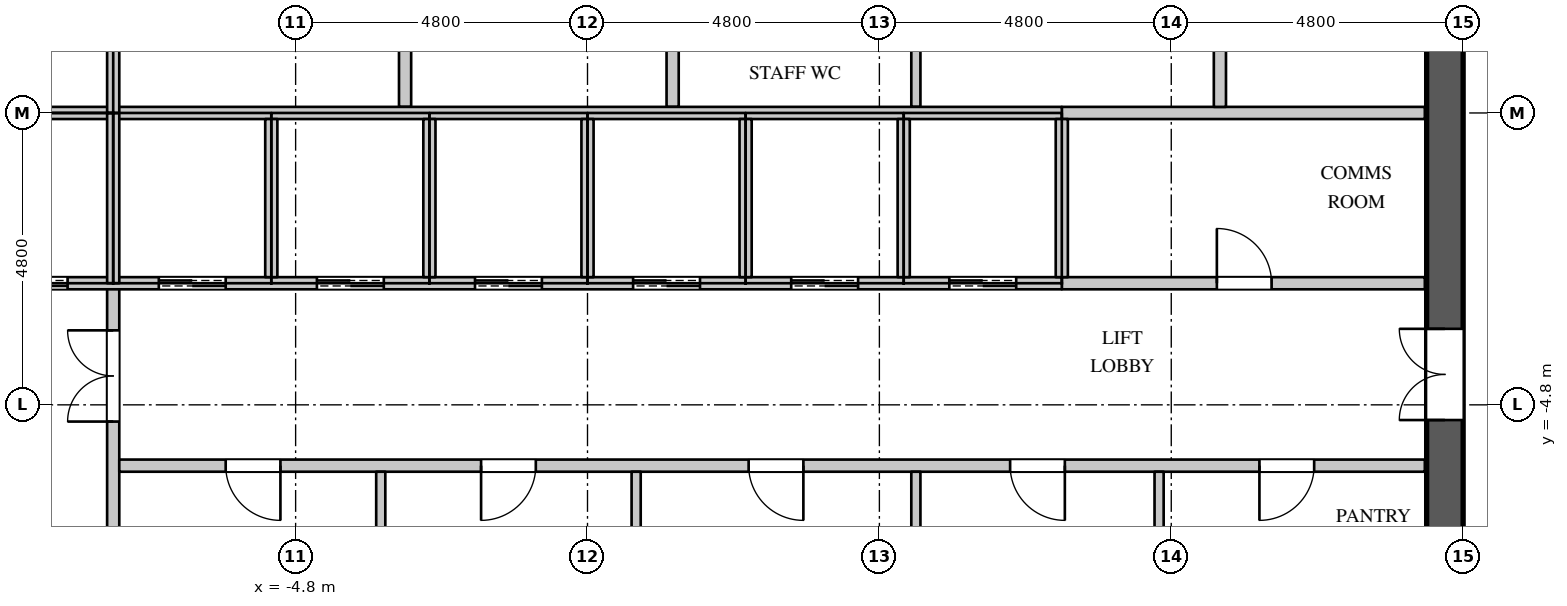
"""IFC4 building model, lengths in metres.
Left out: names, types, materials, properties, quantities, classifications, styles, units other than length and angle.
Written with IfcOpenShell. Run it as: python <this file> out.ifc"""

import sys

from ifc_helpers import new_model, si_unit, direction, frame, frame_2d, origin, place, context, subcontext, project, spatial, rectangle, extrude, element, fill, save


model = new_model("IFC4")
c1 = context("Model", 3, precision=1e-05, world=origin(), true_north=direction((0.0, 1.0)))
c2 = subcontext(c1, "Body", "Model", "MODEL_VIEW")
j1 = project(units=[si_unit("LENGTHUNIT", "METRE"), si_unit("PLANEANGLEUNIT", "RADIAN")], contexts=[c1])
p1 = place(None, origin())
s1 = spatial("IfcSite", under=j1, at=p1, CompositionType="ELEMENT")
p2 = place(p1, origin())
s2 = spatial("IfcBuilding", under=s1, at=p2, CompositionType="ELEMENT")
p3 = place(p2, frame((0.0, 0.0, 213.9)))
s3 = spatial("IfcBuildingStorey", under=s2, at=p3, CompositionType="ELEMENT", Elevation=213.9)
p4 = place(p3, frame((14.1, -11.4, 0.0), z_axis=(0.0, 0.0, 1.0), x_axis=(0.0, 1.0, 0.0)))
e1 = element("IfcWall", 1, at=p4, inside=s3, PredefinedType="SHEAR", context=c2, shape_type="SweptSolid", body=[
    extrude(rectangle(XDim=22.8, YDim=0.6, at=frame_2d((11.4, 0.0))), origin(), (0.0, 0.0, 1.0), 4.2),
])
p5 = place(p4, frame((20.45, 0.0, 0.0)))
e2 = element("IfcOpeningElement", 2, at=p5, cuts=e1, PredefinedType="OPENING", context=c2, shape_type="SweptSolid", body=[
    extrude(rectangle(XDim=1.1, YDim=2.2, at=frame_2d((0.55, 1.1))), frame((0.0, 0.31, 0.0), z_axis=(0.0, -1.0, 0.0), x_axis=(1.0, 0.0, 0.0)), (0.0, 0.0, 1.0), 0.62),
])
p6 = place(p4, frame((1.25, 0.0, 0.0)))
e3 = element("IfcOpeningElement", 3, at=p6, cuts=e1, PredefinedType="OPENING", context=c2, shape_type="SweptSolid", body=[
    extrude(rectangle(XDim=1.1, YDim=2.2, at=frame_2d((0.55, 1.1))), frame((0.0, 0.31, 0.0), z_axis=(0.0, -1.0, 0.0), x_axis=(1.0, 0.0, 0.0)), (0.0, 0.0, 1.0), 0.62),
])
p7 = place(p4, frame((14.95, 0.0, 0.0)))
e4 = element("IfcOpeningElement", 4, at=p7, cuts=e1, PredefinedType="OPENING", context=c2, shape_type="SweptSolid", body=[
    extrude(rectangle(XDim=1.5, YDim=2.4, at=frame_2d((0.75, 1.2))), frame((0.0, 0.31, 0.0), z_axis=(0.0, -1.0, 0.0), x_axis=(1.0, 0.0, 0.0)), (0.0, 0.0, 1.0), 0.62),
])
p8 = place(p4, frame((6.35, 0.0, 0.0)))
e5 = element("IfcOpeningElement", 5, at=p8, cuts=e1, PredefinedType="OPENING", context=c2, shape_type="SweptSolid", body=[
    extrude(rectangle(XDim=1.5, YDim=2.4, at=frame_2d((0.75, 1.2))), frame((0.0, 0.31, 0.0), z_axis=(0.0, -1.0, 0.0), x_axis=(1.0, 0.0, 0.0)), (0.0, 0.0, 1.0), 0.62),
])
p9 = place(p3, frame((-7.8, -8.075, 0.0), z_axis=(0.0, 0.0, 1.0), x_axis=(0.0, 1.0, 0.0)))
e6 = element("IfcWall", 6, at=p9, inside=s3, PredefinedType="PARTITIONING", context=c2, shape_type="SweptSolid", body=[
    extrude(rectangle(XDim=5.275, YDim=0.2, at=frame_2d((2.637, 0.0))), origin(), (0.0, 0.0, 1.0), 3.95),
])
p10 = place(p9, frame((3.0, 0.0, 0.0)))
e7 = element("IfcOpeningElement", 7, at=p10, cuts=e6, PredefinedType="OPENING", context=c2, shape_type="SweptSolid", body=[
    extrude(rectangle(XDim=1.5, YDim=2.4, at=frame_2d((0.75, 1.2))), frame((0.0, 0.11, 0.0), z_axis=(0.0, -1.0, 0.0), x_axis=(1.0, 0.0, 0.0)), (0.0, 0.0, 1.0), 0.22),
])
p11 = place(p3, frame((-7.7, -5.8, 0.0), z_axis=(0.0, 0.0, 1.0), x_axis=(1.0, 0.0, 0.0)))
e8 = element("IfcWall", 8, at=p11, inside=s3, PredefinedType="PARTITIONING", context=c2, shape_type="SweptSolid", body=[
    extrude(rectangle(XDim=21.47, YDim=0.2, at=frame_2d((10.735, 0.0))), origin(), (0.0, 0.0, 1.0), 3.95),
])
p12 = place(p11, frame((1.75, 0.0, 0.0)))
e9 = element("IfcOpeningElement", 9, at=p12, cuts=e8, PredefinedType="OPENING", context=c2, shape_type="SweptSolid", body=[
    extrude(rectangle(XDim=0.9, YDim=2.2, at=frame_2d((0.45, 1.1))), frame((0.0, 0.11, 0.0), z_axis=(0.0, -1.0, 0.0), x_axis=(1.0, 0.0, 0.0)), (0.0, 0.0, 1.0), 0.22),
])
p13 = place(p11, frame((5.95, 0.0, 0.0)))
e10 = element("IfcOpeningElement", 10, at=p13, cuts=e8, PredefinedType="OPENING", context=c2, shape_type="SweptSolid", body=[
    extrude(rectangle(XDim=0.9, YDim=2.2, at=frame_2d((0.45, 1.1))), frame((0.0, 0.11, 0.0), z_axis=(0.0, -1.0, 0.0), x_axis=(1.0, 0.0, 0.0)), (0.0, 0.0, 1.0), 0.22),
])
p14 = place(p11, frame((10.35, 0.0, 0.0)))
e11 = element("IfcOpeningElement", 11, at=p14, cuts=e8, PredefinedType="OPENING", context=c2, shape_type="SweptSolid", body=[
    extrude(rectangle(XDim=0.9, YDim=2.2, at=frame_2d((0.45, 1.1))), frame((0.0, 0.11, 0.0), z_axis=(0.0, -1.0, 0.0), x_axis=(1.0, 0.0, 0.0)), (0.0, 0.0, 1.0), 0.22),
])
p15 = place(p11, frame((14.65, 0.0, 0.0)))
e12 = element("IfcOpeningElement", 12, at=p15, cuts=e8, PredefinedType="OPENING", context=c2, shape_type="SweptSolid", body=[
    extrude(rectangle(XDim=0.9, YDim=2.2, at=frame_2d((0.45, 1.1))), frame((0.0, 0.11, 0.0), z_axis=(0.0, -1.0, 0.0), x_axis=(1.0, 0.0, 0.0)), (0.0, 0.0, 1.0), 0.22),
])
p16 = place(p11, frame((18.75, 0.0, 0.0)))
e13 = element("IfcOpeningElement", 13, at=p16, cuts=e8, PredefinedType="OPENING", context=c2, shape_type="SweptSolid", body=[
    extrude(rectangle(XDim=0.9, YDim=2.2, at=frame_2d((0.45, 1.1))), frame((0.0, 0.11, 0.0), z_axis=(0.0, -1.0, 0.0), x_axis=(1.0, 0.0, 0.0)), (0.0, 0.0, 1.0), 0.22),
])
for number, where, z_axis, x_axis in (
    (14, (-3.4, -11.37, 0.0), (0.0, 0.0, 1.0), (0.0, 1.0, 0.0)),
    (15, (0.8, -11.37, 0.0), (0.0, 0.0, 1.0), (0.0, 1.0, 0.0)),
):
    element("IfcWall", number, at=place(p3, frame(where, z_axis=z_axis, x_axis=x_axis)), inside=s3, PredefinedType="PARTITIONING", context=c2, shape_type="SweptSolid", body=[
        extrude(rectangle(XDim=5.47, YDim=0.15, at=frame_2d((2.735, 0.0))), origin(), (0.0, 0.0, 1.0), 3.95),
    ])
p17 = place(p3, frame((5.4, -8.2, 0.0), z_axis=(0.0, 0.0, 1.0), x_axis=(0.0, 1.0, 0.0)))
e16 = element("IfcWall", 16, at=p17, inside=s3, PredefinedType="PARTITIONING", context=c2, shape_type="SweptSolid", body=[
    extrude(rectangle(XDim=2.3, YDim=0.15, at=frame_2d((1.15, 0.0))), origin(), (0.0, 0.0, 1.0), 3.95),
])
p18 = place(p3, frame((5.4, 0.1, 0.0), z_axis=(0.0, 0.0, 1.0), x_axis=(0.0, 1.0, 0.0)))
e17 = element("IfcWall", 17, at=p18, inside=s3, PredefinedType="PARTITIONING", context=c2, shape_type="SweptSolid", body=[
    extrude(rectangle(XDim=2.6, YDim=0.15, at=frame_2d((1.3, 0.0))), origin(), (0.0, 0.0, 1.0), 3.95),
])
p19 = place(p3, frame((9.4, -8.075, 0.0), z_axis=(0.0, 0.0, 1.0), x_axis=(0.0, 1.0, 0.0)))
e18 = element("IfcWall", 18, at=p19, inside=s3, PredefinedType="PARTITIONING", context=c2, shape_type="SweptSolid", body=[
    extrude(rectangle(XDim=2.175, YDim=0.15, at=frame_2d((1.087, 0.0))), origin(), (0.0, 0.0, 1.0), 3.95),
])
for number, where, z_axis, x_axis in (
    (19, (-3.0, 0.1, 0.0), (0.0, 0.0, 1.0), (0.0, 1.0, 0.0)),
    (20, (1.4, 0.1, 0.0), (0.0, 0.0, 1.0), (0.0, 1.0, 0.0)),
):
    element("IfcWall", number, at=place(p3, frame(where, z_axis=z_axis, x_axis=x_axis)), inside=s3, PredefinedType="PARTITIONING", context=c2, shape_type="SweptSolid", body=[
        extrude(rectangle(XDim=2.6, YDim=0.2, at=frame_2d((1.3, 0.0))), origin(), (0.0, 0.0, 1.0), 3.95),
    ])
p20 = place(p3, frame((7.8, -2.8, 0.0), z_axis=(0.0, 0.0, 1.0), x_axis=(1.0, 0.0, 0.0)))
e21 = element("IfcWall", 21, at=p20, inside=s3, PredefinedType="PARTITIONING", context=c2, shape_type="SweptSolid", body=[
    extrude(rectangle(XDim=5.97, YDim=0.2, at=frame_2d((2.985, 0.0))), origin(), (0.0, 0.0, 1.0), 3.95),
])
p21 = place(p20, frame((2.55, 0.0, 0.0)))
e22 = element("IfcOpeningElement", 22, at=p21, cuts=e21, PredefinedType="OPENING", context=c2, shape_type="SweptSolid", body=[
    extrude(rectangle(XDim=0.9, YDim=2.2, at=frame_2d((0.45, 1.1))), frame((0.0, 0.11, 0.0), z_axis=(0.0, -1.0, 0.0), x_axis=(1.0, 0.0, 0.0)), (0.0, 0.0, 1.0), 0.22),
])
p22 = place(p3, frame((7.8, 0.0, 0.0), z_axis=(0.0, 0.0, 1.0), x_axis=(1.0, 0.0, 0.0)))
e23 = element("IfcWall", 23, at=p22, inside=s3, PredefinedType="PARTITIONING", context=c2, shape_type="SweptSolid", body=[
    extrude(rectangle(XDim=5.97, YDim=0.2, at=frame_2d((2.985, 0.0))), origin(), (0.0, 0.0, 1.0), 3.95),
])
p23 = place(p3, frame((10.4, 0.1, 0.0), z_axis=(0.0, 0.0, 1.0), x_axis=(0.0, 1.0, 0.0)))
e24 = element("IfcWall", 24, at=p23, inside=s3, PredefinedType="PARTITIONING", context=c2, shape_type="SweptSolid", body=[
    extrude(rectangle(XDim=2.6, YDim=0.2, at=frame_2d((1.3, 0.0))), origin(), (0.0, 0.0, 1.0), 3.95),
])
p24 = place(p3, frame((-13.77, 0.0, 0.0), z_axis=(0.0, 0.0, 1.0), x_axis=(1.0, 0.0, 0.0)))
e25 = element("IfcWall", 25, at=p24, inside=s3, PredefinedType="PARTITIONING", context=c2, shape_type="SweptSolid", body=[
    extrude(rectangle(XDim=21.57, YDim=0.2, at=frame_2d((10.785, 0.0))), origin(), (0.0, 0.0, 1.0), 3.95),
])
p25 = place(p3, frame((-10.4, -2.8, 0.0), z_axis=(0.0, 0.0, 1.0), x_axis=(1.0, 0.0, 0.0)))
e26 = element("IfcWall", 26, at=p25, inside=s3, PredefinedType="PARTITIONING", context=c2, shape_type="SweptSolid", body=[
    extrude(rectangle(XDim=18.2, YDim=0.2, at=frame_2d((9.1, 0.0))), origin(), (0.0, 0.0, 1.0), 3.95),
])
p26 = place(p25, frame((0.75, 0.0, 0.0)))
e27 = element("IfcOpeningElement", 27, at=p26, cuts=e26, PredefinedType="OPENING", context=c2, shape_type="SweptSolid", body=[
    extrude(rectangle(XDim=1.1, YDim=2.2, at=frame_2d((0.55, 1.1))), frame((0.0, 0.11, 0.0), z_axis=(0.0, -1.0, 0.0), x_axis=(1.0, 0.0, 0.0)), (0.0, 0.0, 1.0), 0.22),
])
p27 = place(p25, frame((3.35, 0.0, 0.0)))
e28 = element("IfcOpeningElement", 28, at=p27, cuts=e26, PredefinedType="OPENING", context=c2, shape_type="SweptSolid", body=[
    extrude(rectangle(XDim=1.1, YDim=2.2, at=frame_2d((0.55, 1.1))), frame((0.0, 0.11, 0.0), z_axis=(0.0, -1.0, 0.0), x_axis=(1.0, 0.0, 0.0)), (0.0, 0.0, 1.0), 0.22),
])
p28 = place(p25, frame((5.95, 0.0, 0.0)))
e29 = element("IfcOpeningElement", 29, at=p28, cuts=e26, PredefinedType="OPENING", context=c2, shape_type="SweptSolid", body=[
    extrude(rectangle(XDim=1.1, YDim=2.2, at=frame_2d((0.55, 1.1))), frame((0.0, 0.11, 0.0), z_axis=(0.0, -1.0, 0.0), x_axis=(1.0, 0.0, 0.0)), (0.0, 0.0, 1.0), 0.22),
])
p29 = place(p25, frame((8.55, 0.0, 0.0)))
e30 = element("IfcOpeningElement", 30, at=p29, cuts=e26, PredefinedType="OPENING", context=c2, shape_type="SweptSolid", body=[
    extrude(rectangle(XDim=1.1, YDim=2.2, at=frame_2d((0.55, 1.1))), frame((0.0, 0.11, 0.0), z_axis=(0.0, -1.0, 0.0), x_axis=(1.0, 0.0, 0.0)), (0.0, 0.0, 1.0), 0.22),
])
p30 = place(p25, frame((11.15, 0.0, 0.0)))
e31 = element("IfcOpeningElement", 31, at=p30, cuts=e26, PredefinedType="OPENING", context=c2, shape_type="SweptSolid", body=[
    extrude(rectangle(XDim=1.1, YDim=2.2, at=frame_2d((0.55, 1.1))), frame((0.0, 0.11, 0.0), z_axis=(0.0, -1.0, 0.0), x_axis=(1.0, 0.0, 0.0)), (0.0, 0.0, 1.0), 0.22),
])
p31 = place(p25, frame((13.75, 0.0, 0.0)))
e32 = element("IfcOpeningElement", 32, at=p31, cuts=e26, PredefinedType="OPENING", context=c2, shape_type="SweptSolid", body=[
    extrude(rectangle(XDim=1.1, YDim=2.2, at=frame_2d((0.55, 1.1))), frame((0.0, 0.11, 0.0), z_axis=(0.0, -1.0, 0.0), x_axis=(1.0, 0.0, 0.0)), (0.0, 0.0, 1.0), 0.22),
])
p32 = place(p25, frame((16.35, 0.0, 0.0)))
e33 = element("IfcOpeningElement", 33, at=p32, cuts=e26, PredefinedType="OPENING", context=c2, shape_type="SweptSolid", body=[
    extrude(rectangle(XDim=1.1, YDim=2.2, at=frame_2d((0.55, 1.1))), frame((0.0, 0.11, 0.0), z_axis=(0.0, -1.0, 0.0), x_axis=(1.0, 0.0, 0.0)), (0.0, 0.0, 1.0), 0.22),
])
for number, where, z_axis, x_axis in (
    (34, (-7.8, -2.8, 0.0), (0.0, 0.0, 1.0), (0.0, 1.0, 0.0)),
    (35, (-7.8, 0.0, 0.0), (0.0, 0.0, 1.0), (0.0, 1.0, 0.0)),
):
    element("IfcWall", number, at=place(p3, frame(where, z_axis=z_axis, x_axis=x_axis)), inside=s3, PredefinedType="PARTITIONING", context=c2, shape_type="SweptSolid", body=[
        extrude(rectangle(XDim=2.8, YDim=0.2, at=frame_2d((1.4, 0.0))), origin(), (0.0, 0.0, 1.0), 3.95),
    ])
for number, where, z_axis, x_axis in (
    (36, (-5.2, -2.7, 0.0), (0.0, 0.0, 1.0), (0.0, 1.0, 0.0)),
    (37, (-2.6, -2.7, 0.0), (0.0, 0.0, 1.0), (0.0, 1.0, 0.0)),
    (38, (0.0, -2.7, 0.0), (0.0, 0.0, 1.0), (0.0, 1.0, 0.0)),
    (39, (2.6, -2.7, 0.0), (0.0, 0.0, 1.0), (0.0, 1.0, 0.0)),
    (40, (5.2, -2.7, 0.0), (0.0, 0.0, 1.0), (0.0, 1.0, 0.0)),
    (41, (7.8, -2.7, 0.0), (0.0, 0.0, 1.0), (0.0, 1.0, 0.0)),
):
    element("IfcWall", number, at=place(p3, frame(where, z_axis=z_axis, x_axis=x_axis)), inside=s3, PredefinedType="PARTITIONING", context=c2, shape_type="SweptSolid", body=[
        extrude(rectangle(XDim=2.6, YDim=0.2, at=frame_2d((1.3, 0.0))), origin(), (0.0, 0.0, 1.0), 3.95),
    ])
p33 = place(p21, origin())
e42 = element("IfcDoor", 42, at=p33, inside=s3, OperationType="SINGLE_SWING_LEFT", PredefinedType="DOOR", context=c2, shape_type="SweptSolid", body=[
    extrude(rectangle(XDim=0.9, YDim=2.2, at=frame_2d((0.45, 1.1))), frame((0.0, 0.025, 0.0), z_axis=(0.0, -1.0, 0.0), x_axis=(1.0, 0.0, 0.0)), (0.0, 0.0, 1.0), 0.05),
])
fill(e22, e42)
p34 = place(p12, origin())
e43 = element("IfcDoor", 43, at=p34, inside=s3, OperationType="SINGLE_SWING_LEFT", PredefinedType="DOOR", context=c2, shape_type="SweptSolid", body=[
    extrude(rectangle(XDim=0.9, YDim=2.2, at=frame_2d((0.45, 1.1))), frame((0.0, 0.025, 0.0), z_axis=(0.0, -1.0, 0.0), x_axis=(1.0, 0.0, 0.0)), (0.0, 0.0, 1.0), 0.05),
])
fill(e9, e43)
p35 = place(p13, origin())
e44 = element("IfcDoor", 44, at=p35, inside=s3, OperationType="SINGLE_SWING_RIGHT", PredefinedType="DOOR", context=c2, shape_type="SweptSolid", body=[
    extrude(rectangle(XDim=0.9, YDim=2.2, at=frame_2d((0.45, 1.1))), frame((0.0, 0.025, 0.0), z_axis=(0.0, -1.0, 0.0), x_axis=(1.0, 0.0, 0.0)), (0.0, 0.0, 1.0), 0.05),
])
fill(e10, e44)
p36 = place(p14, origin())
e45 = element("IfcDoor", 45, at=p36, inside=s3, OperationType="SINGLE_SWING_LEFT", PredefinedType="DOOR", context=c2, shape_type="SweptSolid", body=[
    extrude(rectangle(XDim=0.9, YDim=2.2, at=frame_2d((0.45, 1.1))), frame((0.0, 0.025, 0.0), z_axis=(0.0, -1.0, 0.0), x_axis=(1.0, 0.0, 0.0)), (0.0, 0.0, 1.0), 0.05),
])
fill(e11, e45)
p37 = place(p15, origin())
e46 = element("IfcDoor", 46, at=p37, inside=s3, OperationType="SINGLE_SWING_LEFT", PredefinedType="DOOR", context=c2, shape_type="SweptSolid", body=[
    extrude(rectangle(XDim=0.9, YDim=2.2, at=frame_2d((0.45, 1.1))), frame((0.0, 0.025, 0.0), z_axis=(0.0, -1.0, 0.0), x_axis=(1.0, 0.0, 0.0)), (0.0, 0.0, 1.0), 0.05),
])
fill(e12, e46)
p38 = place(p16, origin())
e47 = element("IfcDoor", 47, at=p38, inside=s3, OperationType="SINGLE_SWING_RIGHT", PredefinedType="DOOR", context=c2, shape_type="SweptSolid", body=[
    extrude(rectangle(XDim=0.9, YDim=2.2, at=frame_2d((0.45, 1.1))), frame((0.0, 0.025, 0.0), z_axis=(0.0, -1.0, 0.0), x_axis=(1.0, 0.0, 0.0)), (0.0, 0.0, 1.0), 0.05),
])
fill(e13, e47)
p39 = place(p26, origin())
e48 = element("IfcDoor", 48, at=p39, inside=s3, OperationType="DOUBLE_DOOR_SLIDING", PredefinedType="DOOR", context=c2, shape_type="SweptSolid", body=[
    extrude(rectangle(XDim=1.1, YDim=2.2, at=frame_2d((0.55, 1.1))), frame((0.0, 0.025, 0.0), z_axis=(0.0, -1.0, 0.0), x_axis=(1.0, 0.0, 0.0)), (0.0, 0.0, 1.0), 0.05),
])
fill(e27, e48)
p40 = place(p27, origin())
e49 = element("IfcDoor", 49, at=p40, inside=s3, OperationType="DOUBLE_DOOR_SLIDING", PredefinedType="DOOR", context=c2, shape_type="SweptSolid", body=[
    extrude(rectangle(XDim=1.1, YDim=2.2, at=frame_2d((0.55, 1.1))), frame((0.0, 0.025, 0.0), z_axis=(0.0, -1.0, 0.0), x_axis=(1.0, 0.0, 0.0)), (0.0, 0.0, 1.0), 0.05),
])
fill(e28, e49)
p41 = place(p28, origin())
e50 = element("IfcDoor", 50, at=p41, inside=s3, OperationType="DOUBLE_DOOR_SLIDING", PredefinedType="DOOR", context=c2, shape_type="SweptSolid", body=[
    extrude(rectangle(XDim=1.1, YDim=2.2, at=frame_2d((0.55, 1.1))), frame((0.0, 0.025, 0.0), z_axis=(0.0, -1.0, 0.0), x_axis=(1.0, 0.0, 0.0)), (0.0, 0.0, 1.0), 0.05),
])
fill(e29, e50)
p42 = place(p29, origin())
e51 = element("IfcDoor", 51, at=p42, inside=s3, OperationType="DOUBLE_DOOR_SLIDING", PredefinedType="DOOR", context=c2, shape_type="SweptSolid", body=[
    extrude(rectangle(XDim=1.1, YDim=2.2, at=frame_2d((0.55, 1.1))), frame((0.0, 0.025, 0.0), z_axis=(0.0, -1.0, 0.0), x_axis=(1.0, 0.0, 0.0)), (0.0, 0.0, 1.0), 0.05),
])
fill(e30, e51)
p43 = place(p30, origin())
e52 = element("IfcDoor", 52, at=p43, inside=s3, OperationType="DOUBLE_DOOR_SLIDING", PredefinedType="DOOR", context=c2, shape_type="SweptSolid", body=[
    extrude(rectangle(XDim=1.1, YDim=2.2, at=frame_2d((0.55, 1.1))), frame((0.0, 0.025, 0.0), z_axis=(0.0, -1.0, 0.0), x_axis=(1.0, 0.0, 0.0)), (0.0, 0.0, 1.0), 0.05),
])
fill(e31, e52)
p44 = place(p31, origin())
e53 = element("IfcDoor", 53, at=p44, inside=s3, OperationType="DOUBLE_DOOR_SLIDING", PredefinedType="DOOR", context=c2, shape_type="SweptSolid", body=[
    extrude(rectangle(XDim=1.1, YDim=2.2, at=frame_2d((0.55, 1.1))), frame((0.0, 0.025, 0.0), z_axis=(0.0, -1.0, 0.0), x_axis=(1.0, 0.0, 0.0)), (0.0, 0.0, 1.0), 0.05),
])
fill(e32, e53)
p45 = place(p32, origin())
e54 = element("IfcDoor", 54, at=p45, inside=s3, OperationType="DOUBLE_DOOR_SLIDING", PredefinedType="DOOR", context=c2, shape_type="SweptSolid", body=[
    extrude(rectangle(XDim=1.1, YDim=2.2, at=frame_2d((0.55, 1.1))), frame((0.0, 0.025, 0.0), z_axis=(0.0, -1.0, 0.0), x_axis=(1.0, 0.0, 0.0)), (0.0, 0.0, 1.0), 0.05),
])
fill(e33, e54)
p46 = place(p10, origin())
e55 = element("IfcDoor", 55, at=p46, inside=s3, OperationType="DOUBLE_DOOR_SINGLE_SWING", PredefinedType="DOOR", context=c2, shape_type="SweptSolid", body=[
    extrude(rectangle(XDim=1.5, YDim=2.4, at=frame_2d((0.75, 1.2))), frame((0.0, 0.025, 0.0), z_axis=(0.0, -1.0, 0.0), x_axis=(1.0, 0.0, 0.0)), (0.0, 0.0, 1.0), 0.05),
])
fill(e7, e55)
p47 = place(p8, origin())
e56 = element("IfcDoor", 56, at=p47, inside=s3, OperationType="DOUBLE_DOOR_SINGLE_SWING", PredefinedType="DOOR", context=c2, shape_type="SweptSolid", body=[
    extrude(rectangle(XDim=1.5, YDim=2.4, at=frame_2d((0.75, 1.2))), frame((0.0, 0.295, 0.0), z_axis=(0.0, -1.0, 0.0), x_axis=(1.0, 0.0, 0.0)), (0.0, 0.0, 1.0), 0.05),
])
fill(e5, e56)
save(model, sys.argv[1])
